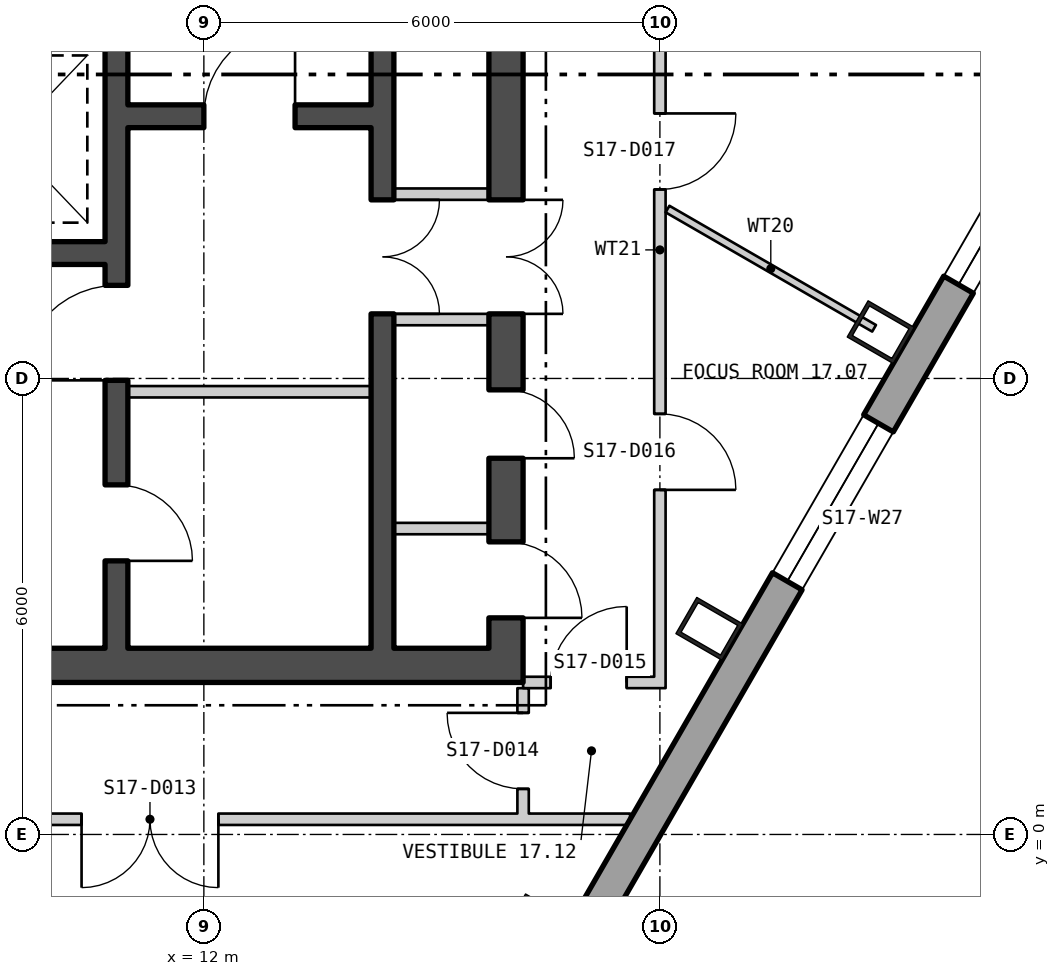
"""IFC4 building model, lengths in metres.
Left out: names, types, materials, properties, quantities, classifications, styles, units other than length and angle.
Written with IfcOpenShell. Run it as: python <this file> out.ifc"""

import sys

from ifc_helpers import new_model, si_unit, direction, frame, frame_2d, origin, origin_2d, place, context, subcontext, project, spatial, polyline, rectangle, hollow_rectangle, outline, extrude, element, fill, save


model = new_model("IFC4")
c1 = context("Model", 3, precision=1e-05, world=origin(), true_north=direction((0.0, 1.0)))
c2 = subcontext(c1, "Body", "Model", "MODEL_VIEW")
j1 = project(units=[si_unit("LENGTHUNIT", "METRE"), si_unit("PLANEANGLEUNIT", "RADIAN")], contexts=[c1])
p1 = place(None, origin())
s1 = spatial("IfcSite", under=j1, at=p1, CompositionType="ELEMENT")
p2 = place(p1, origin())
s2 = spatial("IfcBuilding", under=s1, at=p2, CompositionType="ELEMENT")
p3 = place(p2, frame((0.0, 0.0, 227.7)))
s3 = spatial("IfcBuildingStorey", under=s2, at=p3, CompositionType="ELEMENT", Elevation=227.7)
for number, where, z_axis, x_axis in (
    (1, (16.398, -1.196, 0.0), (0.0, 0.0, 1.0), (0.5, 0.866, 0.0)),
    (2, (18.651, 2.706, 0.0), (0.0, 0.0, 1.0), (0.5, 0.866, 0.0)),
    (3, (20.905, 6.609, 0.0), (0.0, 0.0, 1.0), (0.5, 0.866, 0.0)),
):
    element("IfcColumn", number, at=place(p3, frame(where, z_axis=z_axis, x_axis=x_axis)), inside=s3, PredefinedType="COLUMN", context=c2, shape_type="SweptSolid", body=[
        extrude(hollow_rectangle(XDim=0.55, YDim=0.7, WallThickness=0.05, at=origin_2d()), origin(), (0.0, 0.0, 1.0), 3.9),
    ])
p4 = place(p3, frame((3.21, -25.189, -0.18), z_axis=(0.0, 0.0, 1.0), x_axis=(0.499999194392, 0.866025868902, 0.0)))
e4 = element("IfcWall", 4, at=p4, inside=s3, PredefinedType="SOLIDWALL", context=c2, shape_type="SweptSolid", body=[
    extrude(outline(polyline([(-0.13, -0.225), (45.86, -0.225), (45.6, 0.225), (0.13, 0.225), (-0.13, -0.225)])), origin(), (0.0, 0.0, 1.0), 3.68),
])
p5 = place(p4, frame((1.424, 0.0, 1.08)))
e5 = element("IfcOpeningElement", 5, at=p5, cuts=e4, PredefinedType="OPENING", context=c2, shape_type="SweptSolid", body=[
    extrude(rectangle(XDim=2.4, YDim=2.0, at=frame_2d((1.2, 1.0))), frame((0.0, 0.235, 0.0), z_axis=(0.0, -1.0, 0.0), x_axis=(1.0, 0.0, 0.0)), (0.0, 0.0, 1.0), 0.47),
])
p6 = place(p4, frame((5.892, 0.0, 1.08)))
e6 = element("IfcOpeningElement", 6, at=p6, cuts=e4, PredefinedType="OPENING", context=c2, shape_type="SweptSolid", body=[
    extrude(rectangle(XDim=2.4, YDim=2.0, at=frame_2d((1.2, 1.0))), frame((0.0, 0.235, 0.0), z_axis=(0.0, -1.0, 0.0), x_axis=(1.0, 0.0, 0.0)), (0.0, 0.0, 1.0), 0.47),
])
p7 = place(p4, frame((10.399, 0.0, 1.08)))
e7 = element("IfcOpeningElement", 7, at=p7, cuts=e4, PredefinedType="OPENING", context=c2, shape_type="SweptSolid", body=[
    extrude(rectangle(XDim=2.4, YDim=2.0, at=frame_2d((1.2, 1.0))), frame((0.0, 0.235, 0.0), z_axis=(0.0, -1.0, 0.0), x_axis=(1.0, 0.0, 0.0)), (0.0, 0.0, 1.0), 0.47),
])
p8 = place(p4, frame((14.905, 0.0, 1.08)))
e8 = element("IfcOpeningElement", 8, at=p8, cuts=e4, PredefinedType="OPENING", context=c2, shape_type="SweptSolid", body=[
    extrude(rectangle(XDim=2.4, YDim=2.0, at=frame_2d((1.2, 1.0))), frame((0.0, 0.235, 0.0), z_axis=(0.0, -1.0, 0.0), x_axis=(1.0, 0.0, 0.0)), (0.0, 0.0, 1.0), 0.47),
])
p9 = place(p4, frame((19.412, 0.0, 1.08)))
e9 = element("IfcOpeningElement", 9, at=p9, cuts=e4, PredefinedType="OPENING", context=c2, shape_type="SweptSolid", body=[
    extrude(rectangle(XDim=2.4, YDim=2.0, at=frame_2d((1.2, 1.0))), frame((0.0, 0.235, 0.0), z_axis=(0.0, -1.0, 0.0), x_axis=(1.0, 0.0, 0.0)), (0.0, 0.0, 1.0), 0.47),
])
p10 = place(p4, frame((23.918, 0.0, 1.08)))
e10 = element("IfcOpeningElement", 10, at=p10, cuts=e4, PredefinedType="OPENING", context=c2, shape_type="SweptSolid", body=[
    extrude(rectangle(XDim=2.4, YDim=2.0, at=frame_2d((1.2, 1.0))), frame((0.0, 0.235, 0.0), z_axis=(0.0, -1.0, 0.0), x_axis=(1.0, 0.0, 0.0)), (0.0, 0.0, 1.0), 0.47),
])
p11 = place(p4, frame((32.932, 0.0, 1.08)))
e11 = element("IfcOpeningElement", 11, at=p11, cuts=e4, PredefinedType="OPENING", context=c2, shape_type="SweptSolid", body=[
    extrude(rectangle(XDim=2.4, YDim=2.0, at=frame_2d((1.2, 1.0))), frame((0.0, 0.235, 0.0), z_axis=(0.0, -1.0, 0.0), x_axis=(1.0, 0.0, 0.0)), (0.0, 0.0, 1.0), 0.47),
])
p12 = place(p4, frame((37.438, 0.0, 1.08)))
e12 = element("IfcOpeningElement", 12, at=p12, cuts=e4, PredefinedType="OPENING", context=c2, shape_type="SweptSolid", body=[
    extrude(rectangle(XDim=2.4, YDim=2.0, at=frame_2d((1.2, 1.0))), frame((0.0, 0.235, 0.0), z_axis=(0.0, -1.0, 0.0), x_axis=(1.0, 0.0, 0.0)), (0.0, 0.0, 1.0), 0.47),
])
p13 = place(p4, frame((41.907, 0.0, 1.08)))
e13 = element("IfcOpeningElement", 13, at=p13, cuts=e4, PredefinedType="OPENING", context=c2, shape_type="SweptSolid", body=[
    extrude(rectangle(XDim=2.4, YDim=2.0, at=frame_2d((1.2, 1.0))), frame((0.0, 0.235, 0.0), z_axis=(0.0, -1.0, 0.0), x_axis=(1.0, 0.0, 0.0)), (0.0, 0.0, 1.0), 0.47),
])
p14 = place(p3, frame((-16.2, 2.225, 0.0), z_axis=(0.0, 0.0, 1.0), x_axis=(1.0, 0.0, 0.0)))
e14 = element("IfcWall", 14, at=p14, inside=s3, PredefinedType="SHEAR", context=c2, shape_type="SweptSolid", body=[
    extrude(rectangle(XDim=32.4, YDim=0.45, at=frame_2d((16.2, 0.0))), origin(), (0.0, 0.0, 1.0), 3.7),
])
p15 = place(p14, frame((10.7, 0.0, 0.0)))
e15 = element("IfcOpeningElement", 15, at=p15, cuts=e14, PredefinedType="OPENING", context=c2, shape_type="SweptSolid", body=[
    extrude(rectangle(XDim=1.8, YDim=2.4, at=frame_2d((0.9, 1.2))), frame((0.0, 0.235, 0.0), z_axis=(0.0, -1.0, 0.0), x_axis=(1.0, 0.0, 0.0)), (0.0, 0.0, 1.0), 0.47),
])
p16 = place(p14, frame((20.7, 0.0, 0.0)))
e16 = element("IfcOpeningElement", 16, at=p16, cuts=e14, PredefinedType="OPENING", context=c2, shape_type="SweptSolid", body=[
    extrude(rectangle(XDim=1.8, YDim=2.4, at=frame_2d((0.9, 1.2))), frame((0.0, 0.235, 0.0), z_axis=(0.0, -1.0, 0.0), x_axis=(1.0, 0.0, 0.0)), (0.0, 0.0, 1.0), 0.47),
])
p17 = place(p3, frame((15.975, 2.45, 0.0), z_axis=(0.0, 0.0, 1.0), x_axis=(0.0, 1.0, 0.0)))
e17 = element("IfcWall", 17, at=p17, inside=s3, PredefinedType="SHEAR", context=c2, shape_type="SweptSolid", body=[
    extrude(rectangle(XDim=15.1, YDim=0.45, at=frame_2d((7.55, 0.0))), origin(), (0.0, 0.0, 1.0), 3.7),
])
p18 = place(p17, frame((4.4, 0.0, 0.0)))
e18 = element("IfcOpeningElement", 18, at=p18, cuts=e17, PredefinedType="OPENING", context=c2, shape_type="SweptSolid", body=[
    extrude(rectangle(XDim=1.5, YDim=2.1, at=frame_2d((0.75, 1.05))), frame((0.0, 0.235, 0.0), z_axis=(0.0, -1.0, 0.0), x_axis=(1.0, 0.0, 0.0)), (0.0, 0.0, 1.0), 0.47),
])
p19 = place(p17, frame((0.4, 0.0, 0.0)))
e19 = element("IfcOpeningElement", 19, at=p19, cuts=e17, PredefinedType="OPENING", context=c2, shape_type="SweptSolid", body=[
    extrude(rectangle(XDim=1.0, YDim=2.1, at=frame_2d((0.5, 1.05))), frame((0.0, 0.235, 0.0), z_axis=(0.0, -1.0, 0.0), x_axis=(1.0, 0.0, 0.0)), (0.0, 0.0, 1.0), 0.47),
])
p20 = place(p17, frame((2.5, 0.0, 0.0)))
e20 = element("IfcOpeningElement", 20, at=p20, cuts=e17, PredefinedType="OPENING", context=c2, shape_type="SweptSolid", body=[
    extrude(rectangle(XDim=0.9, YDim=2.1, at=frame_2d((0.45, 1.05))), frame((0.0, 0.235, 0.0), z_axis=(0.0, -1.0, 0.0), x_axis=(1.0, 0.0, 0.0)), (0.0, 0.0, 1.0), 0.47),
])
p21 = place(p17, frame((9.071, 0.0, 0.0)))
e21 = element("IfcOpeningElement", 21, at=p21, cuts=e17, PredefinedType="OPENING", context=c2, shape_type="SweptSolid", body=[
    extrude(rectangle(XDim=0.9, YDim=2.1, at=frame_2d((0.45, 1.05))), frame((0.0, 0.235, 0.0), z_axis=(0.0, -1.0, 0.0), x_axis=(1.0, 0.0, 0.0)), (0.0, 0.0, 1.0), 0.47),
])
p22 = place(p17, frame((13.671, 0.0, 0.0)))
e22 = element("IfcOpeningElement", 22, at=p22, cuts=e17, PredefinedType="OPENING", context=c2, shape_type="SweptSolid", body=[
    extrude(rectangle(XDim=0.9, YDim=2.1, at=frame_2d((0.45, 1.05))), frame((0.0, 0.235, 0.0), z_axis=(0.0, -1.0, 0.0), x_axis=(1.0, 0.0, 0.0)), (0.0, 0.0, 1.0), 0.47),
])
p23 = place(p3, frame((10.85, 2.45, 0.0), z_axis=(0.0, 0.0, 1.0), x_axis=(0.0, 1.0, 0.0)))
e23 = element("IfcWall", 23, at=p23, inside=s3, PredefinedType="SHEAR", context=c2, shape_type="SweptSolid", body=[
    extrude(rectangle(XDim=15.1, YDim=0.3, at=frame_2d((7.55, 0.0))), origin(), (0.0, 0.0, 1.0), 3.7),
])
p24 = place(p23, frame((3.525, 0.0, 0.0)))
e24 = element("IfcOpeningElement", 24, at=p24, cuts=e23, PredefinedType="OPENING", context=c2, shape_type="SweptSolid", body=[
    extrude(rectangle(XDim=1.25, YDim=2.1, at=frame_2d((0.625, 1.05))), frame((0.0, 0.16, 0.0), z_axis=(0.0, -1.0, 0.0), x_axis=(1.0, 0.0, 0.0)), (0.0, 0.0, 1.0), 0.32),
])
p25 = place(p23, frame((1.15, 0.0, 0.0)))
e25 = element("IfcOpeningElement", 25, at=p25, cuts=e23, PredefinedType="OPENING", context=c2, shape_type="SweptSolid", body=[
    extrude(rectangle(XDim=1.0, YDim=2.1, at=frame_2d((0.5, 1.05))), frame((0.0, 0.16, 0.0), z_axis=(0.0, -1.0, 0.0), x_axis=(1.0, 0.0, 0.0)), (0.0, 0.0, 1.0), 0.32),
])
p26 = place(p3, frame((14.35, 2.45, 0.0), z_axis=(0.0, 0.0, 1.0), x_axis=(0.0, 1.0, 0.0)))
e26 = element("IfcWall", 26, at=p26, inside=s3, PredefinedType="SHEAR", context=c2, shape_type="SweptSolid", body=[
    extrude(rectangle(XDim=15.1, YDim=0.3, at=frame_2d((7.55, 0.0))), origin(), (0.0, 0.0, 1.0), 3.7),
])
p27 = place(p26, frame((4.4, 0.0, 0.0)))
e27 = element("IfcOpeningElement", 27, at=p27, cuts=e26, PredefinedType="OPENING", context=c2, shape_type="SweptSolid", body=[
    extrude(rectangle(XDim=1.5, YDim=2.1, at=frame_2d((0.75, 1.05))), frame((0.0, 0.16, 0.0), z_axis=(0.0, -1.0, 0.0), x_axis=(1.0, 0.0, 0.0)), (0.0, 0.0, 1.0), 0.32),
])
p28 = place(p3, frame((11.0, 9.45, 0.0), z_axis=(0.0, 0.0, 1.0), x_axis=(1.0, 0.0, 0.0)))
e28 = element("IfcWall", 28, at=p28, inside=s3, PredefinedType="SHEAR", context=c2, shape_type="SweptSolid", body=[
    extrude(rectangle(XDim=3.2, YDim=0.3, at=frame_2d((1.6, 0.0))), origin(), (0.0, 0.0, 1.0), 3.7),
])
p29 = place(p28, frame((1.0, 0.0, 0.0)))
e29 = element("IfcOpeningElement", 29, at=p29, cuts=e28, PredefinedType="OPENING", context=c2, shape_type="SweptSolid", body=[
    extrude(rectangle(XDim=1.2, YDim=2.1, at=frame_2d((0.6, 1.05))), frame((0.0, 0.16, 0.0), z_axis=(0.0, -1.0, 0.0), x_axis=(1.0, 0.0, 0.0)), (0.0, 0.0, 1.0), 0.32),
])
p30 = place(p3, frame((2.6, 7.65, 0.0), z_axis=(0.0, 0.0, 1.0), x_axis=(1.0, 0.0, 0.0)))
e30 = element("IfcWall", 30, at=p30, inside=s3, PredefinedType="SHEAR", context=c2, shape_type="SweptSolid", body=[
    extrude(rectangle(XDim=8.1, YDim=0.3, at=frame_2d((4.05, 0.0))), origin(), (0.0, 0.0, 1.0), 3.7),
])
p31 = place(p3, frame((11.0, 5.825, 0.0), z_axis=(0.0, 0.0, 1.0), x_axis=(1.0, 0.0, 0.0)))
e31 = element("IfcWall", 31, at=p31, inside=s3, PredefinedType="PARTITIONING", context=c2, shape_type="SweptSolid", body=[
    extrude(rectangle(XDim=3.2, YDim=0.15, at=frame_2d((1.6, 0.0))), origin(), (0.0, 0.0, 1.0), 3.7),
])
for number, where, z_axis, x_axis in (
    (32, (14.5, 6.775, 0.0), (0.0, 0.0, 1.0), (1.0, 0.0, 0.0)),
    (33, (14.5, 8.425, 0.0), (0.0, 0.0, 1.0), (1.0, 0.0, 0.0)),
    (34, (14.5, 4.025, 0.0), (0.0, 0.0, 1.0), (1.0, 0.0, 0.0)),
):
    element("IfcWall", number, at=place(p3, frame(where, z_axis=z_axis, x_axis=x_axis)), inside=s3, PredefinedType="PARTITIONING", context=c2, shape_type="SweptSolid", body=[
        extrude(rectangle(XDim=1.25, YDim=0.15, at=frame_2d((0.625, 0.0))), origin(), (0.0, 0.0, 1.0), 3.7),
    ])
p32 = place(p3, frame((6.67, 0.2, 0.0), z_axis=(0.0, 0.0, 1.0), x_axis=(1.0, 0.0, 0.0)))
e35 = element("IfcWall", 35, at=p32, inside=s3, PredefinedType="PARTITIONING", context=c2, shape_type="SweptSolid", body=[
    extrude(rectangle(XDim=10.938, YDim=0.15, at=frame_2d((5.469, 0.0))), origin(), (0.0, 0.0, 1.0), 3.7),
])
p33 = place(p32, frame((3.721, 0.0, 0.0)))
e36 = element("IfcOpeningElement", 36, at=p33, cuts=e35, PredefinedType="OPENING", context=c2, shape_type="SweptSolid", body=[
    extrude(rectangle(XDim=1.8, YDim=2.1, at=frame_2d((0.9, 1.05))), frame((0.0, 0.085, 0.0), z_axis=(0.0, -1.0, 0.0), x_axis=(1.0, 0.0, 0.0)), (0.0, 0.0, 1.0), 0.17),
])
p34 = place(p3, frame((16.2, 0.275, 0.0), z_axis=(0.0, 0.0, 1.0), x_axis=(0.0, 1.0, 0.0)))
e37 = element("IfcWall", 37, at=p34, inside=s3, PredefinedType="PARTITIONING", context=c2, shape_type="SweptSolid", body=[
    extrude(rectangle(XDim=1.65, YDim=0.15, at=frame_2d((0.825, 0.0))), origin(), (0.0, 0.0, 1.0), 3.7),
])
p35 = place(p34, frame((0.325, 0.0, 0.0)))
e38 = element("IfcOpeningElement", 38, at=p35, cuts=e37, PredefinedType="OPENING", context=c2, shape_type="SweptSolid", body=[
    extrude(rectangle(XDim=1.0, YDim=2.1, at=frame_2d((0.5, 1.05))), frame((0.0, 0.085, 0.0), z_axis=(0.0, -1.0, 0.0), x_axis=(1.0, 0.0, 0.0)), (0.0, 0.0, 1.0), 0.17),
])
p36 = place(p3, frame((16.2, 2.0, 0.0), z_axis=(0.0, 0.0, 1.0), x_axis=(1.0, 0.0, 0.0)))
e39 = element("IfcWall", 39, at=p36, inside=s3, PredefinedType="PARTITIONING", context=c2, shape_type="SweptSolid", body=[
    extrude(rectangle(XDim=1.725, YDim=0.15, at=frame_2d((0.863, 0.0))), origin(), (0.0, 0.0, 1.0), 3.11),
])
p37 = place(p36, frame((0.363, 0.0, 0.0)))
e40 = element("IfcOpeningElement", 40, at=p37, cuts=e39, PredefinedType="OPENING", context=c2, shape_type="SweptSolid", body=[
    extrude(rectangle(XDim=1.0, YDim=2.1, at=frame_2d((0.5, 1.05))), frame((0.0, 0.085, 0.0), z_axis=(0.0, -1.0, 0.0), x_axis=(1.0, 0.0, 0.0)), (0.0, 0.0, 1.0), 0.17),
])
p38 = place(p3, frame((18.0, 1.925, 0.0), z_axis=(0.0, 0.0, 1.0), x_axis=(0.0, 1.0, 0.0)))
e41 = element("IfcWall", 41, at=p38, inside=s3, PredefinedType="PARTITIONING", context=c2, shape_type="SweptSolid", body=[
    extrude(rectangle(XDim=11.533, YDim=0.15, at=frame_2d((5.766, 0.0))), origin(), (0.0, 0.0, 1.0), 3.7),
])
p39 = place(p38, frame((2.609, 0.0, 0.0)))
e42 = element("IfcOpeningElement", 42, at=p39, cuts=e41, PredefinedType="OPENING", context=c2, shape_type="SweptSolid", body=[
    extrude(rectangle(XDim=1.0, YDim=2.1, at=frame_2d((0.5, 1.05))), frame((0.0, 0.085, 0.0), z_axis=(0.0, -1.0, 0.0), x_axis=(1.0, 0.0, 0.0)), (0.0, 0.0, 1.0), 0.17),
])
p40 = place(p38, frame((6.562, 0.0, 0.0)))
e43 = element("IfcOpeningElement", 43, at=p40, cuts=e41, PredefinedType="OPENING", context=c2, shape_type="SweptSolid", body=[
    extrude(rectangle(XDim=1.0, YDim=2.1, at=frame_2d((0.5, 1.05))), frame((0.0, 0.085, 0.0), z_axis=(0.0, -1.0, 0.0), x_axis=(1.0, 0.0, 0.0)), (0.0, 0.0, 1.0), 0.17),
])
p41 = place(p3, frame((18.1, 8.229, 0.0), z_axis=(0.0, 0.0, 1.0), x_axis=(0.866058244174, -0.499943114462, 0.0)))
e44 = element("IfcWall", 44, at=p41, inside=s3, PredefinedType="PARTITIONING", context=c2, shape_type="SweptSolid", body=[
    extrude(rectangle(XDim=3.138, YDim=0.1, at=frame_2d((1.569, 0.0))), origin(), (0.0, 0.0, 1.0), 3.7),
])
p42 = place(p11, origin())
e45 = element("IfcWindow", 45, at=p42, inside=s3, PartitioningType="SINGLE_PANEL", PredefinedType="WINDOW", context=c2, shape_type="SweptSolid", body=[
    extrude(rectangle(XDim=2.4, YDim=2.0, at=frame_2d((1.2, 1.0))), frame((0.0, 0.105, 0.0), z_axis=(0.0, -1.0, 0.0), x_axis=(1.0, 0.0, 0.0)), (0.0, 0.0, 1.0), 0.06),
])
fill(e11, e45)
p43 = place(p12, origin())
e46 = element("IfcWindow", 46, at=p43, inside=s3, PartitioningType="SINGLE_PANEL", PredefinedType="WINDOW", context=c2, shape_type="SweptSolid", body=[
    extrude(rectangle(XDim=2.4, YDim=2.0, at=frame_2d((1.2, 1.0))), frame((0.0, 0.105, 0.0), z_axis=(0.0, -1.0, 0.0), x_axis=(1.0, 0.0, 0.0)), (0.0, 0.0, 1.0), 0.06),
])
fill(e12, e46)
p44 = place(p29, origin())
e47 = element("IfcDoor", 47, at=p44, inside=s3, OperationType="SINGLE_SWING_LEFT", PredefinedType="DOOR", context=c2, shape_type="SweptSolid", body=[
    extrude(rectangle(XDim=1.2, YDim=2.1, at=frame_2d((0.6, 1.05))), frame((0.0, 0.025, 0.0), z_axis=(0.0, -1.0, 0.0), x_axis=(1.0, 0.0, 0.0)), (0.0, 0.0, 1.0), 0.05),
])
fill(e29, e47)
p45 = place(p24, origin())
e48 = element("IfcDoor", 48, at=p45, inside=s3, OperationType="SINGLE_SWING_RIGHT", PredefinedType="DOOR", context=c2, shape_type="SweptSolid", body=[
    extrude(rectangle(XDim=1.25, YDim=2.1, at=frame_2d((0.625, 1.05))), frame((0.0, 0.025, 0.0), z_axis=(0.0, -1.0, 0.0), x_axis=(1.0, 0.0, 0.0)), (0.0, 0.0, 1.0), 0.05),
])
fill(e24, e48)
p46 = place(p25, origin())
e49 = element("IfcDoor", 49, at=p46, inside=s3, OperationType="SINGLE_SWING_LEFT", PredefinedType="DOOR", context=c2, shape_type="SweptSolid", body=[
    extrude(rectangle(XDim=1.0, YDim=2.1, at=frame_2d((0.5, 1.05))), frame((0.0, 0.025, 0.0), z_axis=(0.0, -1.0, 0.0), x_axis=(1.0, 0.0, 0.0)), (0.0, 0.0, 1.0), 0.05),
])
fill(e25, e49)
p47 = place(p27, origin())
e50 = element("IfcDoor", 50, at=p47, inside=s3, OperationType="DOUBLE_DOOR_SINGLE_SWING", PredefinedType="DOOR", context=c2, shape_type="SweptSolid", body=[
    extrude(rectangle(XDim=1.5, YDim=2.1, at=frame_2d((0.75, 1.05))), frame((0.0, 0.025, 0.0), z_axis=(0.0, -1.0, 0.0), x_axis=(1.0, 0.0, 0.0)), (0.0, 0.0, 1.0), 0.05),
])
fill(e27, e50)
p48 = place(p18, origin())
e51 = element("IfcDoor", 51, at=p48, inside=s3, OperationType="DOUBLE_DOOR_SINGLE_SWING", PredefinedType="DOOR", context=c2, shape_type="SweptSolid", body=[
    extrude(rectangle(XDim=1.5, YDim=2.1, at=frame_2d((0.75, 1.05))), frame((0.0, 0.025, 0.0), z_axis=(0.0, -1.0, 0.0), x_axis=(1.0, 0.0, 0.0)), (0.0, 0.0, 1.0), 0.05),
])
fill(e18, e51)
p49 = place(p19, origin())
e52 = element("IfcDoor", 52, at=p49, inside=s3, OperationType="SINGLE_SWING_LEFT", PredefinedType="DOOR", context=c2, shape_type="SweptSolid", body=[
    extrude(rectangle(XDim=1.0, YDim=2.1, at=frame_2d((0.5, 1.05))), frame((0.0, 0.025, 0.0), z_axis=(0.0, -1.0, 0.0), x_axis=(1.0, 0.0, 0.0)), (0.0, 0.0, 1.0), 0.05),
])
fill(e19, e52)
p50 = place(p20, origin())
e53 = element("IfcDoor", 53, at=p50, inside=s3, OperationType="SINGLE_SWING_LEFT", PredefinedType="DOOR", context=c2, shape_type="SweptSolid", body=[
    extrude(rectangle(XDim=0.9, YDim=2.1, at=frame_2d((0.45, 1.05))), frame((0.0, 0.025, 0.0), z_axis=(0.0, -1.0, 0.0), x_axis=(1.0, 0.0, 0.0)), (0.0, 0.0, 1.0), 0.05),
])
fill(e20, e53)
p51 = place(p33, origin())
e54 = element("IfcDoor", 54, at=p51, inside=s3, OperationType="DOUBLE_DOOR_SINGLE_SWING", PredefinedType="DOOR", context=c2, shape_type="SweptSolid", body=[
    extrude(rectangle(XDim=1.8, YDim=2.1, at=frame_2d((0.9, 1.05))), frame((0.0, 0.025, 0.0), z_axis=(0.0, -1.0, 0.0), x_axis=(1.0, 0.0, 0.0)), (0.0, 0.0, 1.0), 0.05),
])
fill(e36, e54)
p52 = place(p35, origin())
e55 = element("IfcDoor", 55, at=p52, inside=s3, OperationType="SINGLE_SWING_LEFT", PredefinedType="DOOR", context=c2, shape_type="SweptSolid", body=[
    extrude(rectangle(XDim=1.0, YDim=2.1, at=frame_2d((0.5, 1.05))), frame((0.0, 0.025, 0.0), z_axis=(0.0, -1.0, 0.0), x_axis=(1.0, 0.0, 0.0)), (0.0, 0.0, 1.0), 0.05),
])
fill(e38, e55)
p53 = place(p37, origin())
e56 = element("IfcDoor", 56, at=p53, inside=s3, OperationType="SINGLE_SWING_LEFT", PredefinedType="DOOR", context=c2, shape_type="SweptSolid", body=[
    extrude(rectangle(XDim=1.0, YDim=2.1, at=frame_2d((0.5, 1.05))), frame((0.0, 0.025, 0.0), z_axis=(0.0, -1.0, 0.0), x_axis=(1.0, 0.0, 0.0)), (0.0, 0.0, 1.0), 0.05),
])
fill(e40, e56)
p54 = place(p39, origin())
e57 = element("IfcDoor", 57, at=p54, inside=s3, OperationType="SINGLE_SWING_LEFT", PredefinedType="DOOR", context=c2, shape_type="SweptSolid", body=[
    extrude(rectangle(XDim=1.0, YDim=2.1, at=frame_2d((0.5, 1.05))), frame((0.0, 0.025, 0.0), z_axis=(0.0, -1.0, 0.0), x_axis=(1.0, 0.0, 0.0)), (0.0, 0.0, 1.0), 0.05),
])
fill(e42, e57)
p55 = place(p40, origin())
e58 = element("IfcDoor", 58, at=p55, inside=s3, OperationType="SINGLE_SWING_RIGHT", PredefinedType="DOOR", context=c2, shape_type="SweptSolid", body=[
    extrude(rectangle(XDim=1.0, YDim=2.1, at=frame_2d((0.5, 1.05))), frame((0.0, 0.025, 0.0), z_axis=(0.0, -1.0, 0.0), x_axis=(1.0, 0.0, 0.0)), (0.0, 0.0, 1.0), 0.05),
])
fill(e43, e58)
save(model, sys.argv[1])
